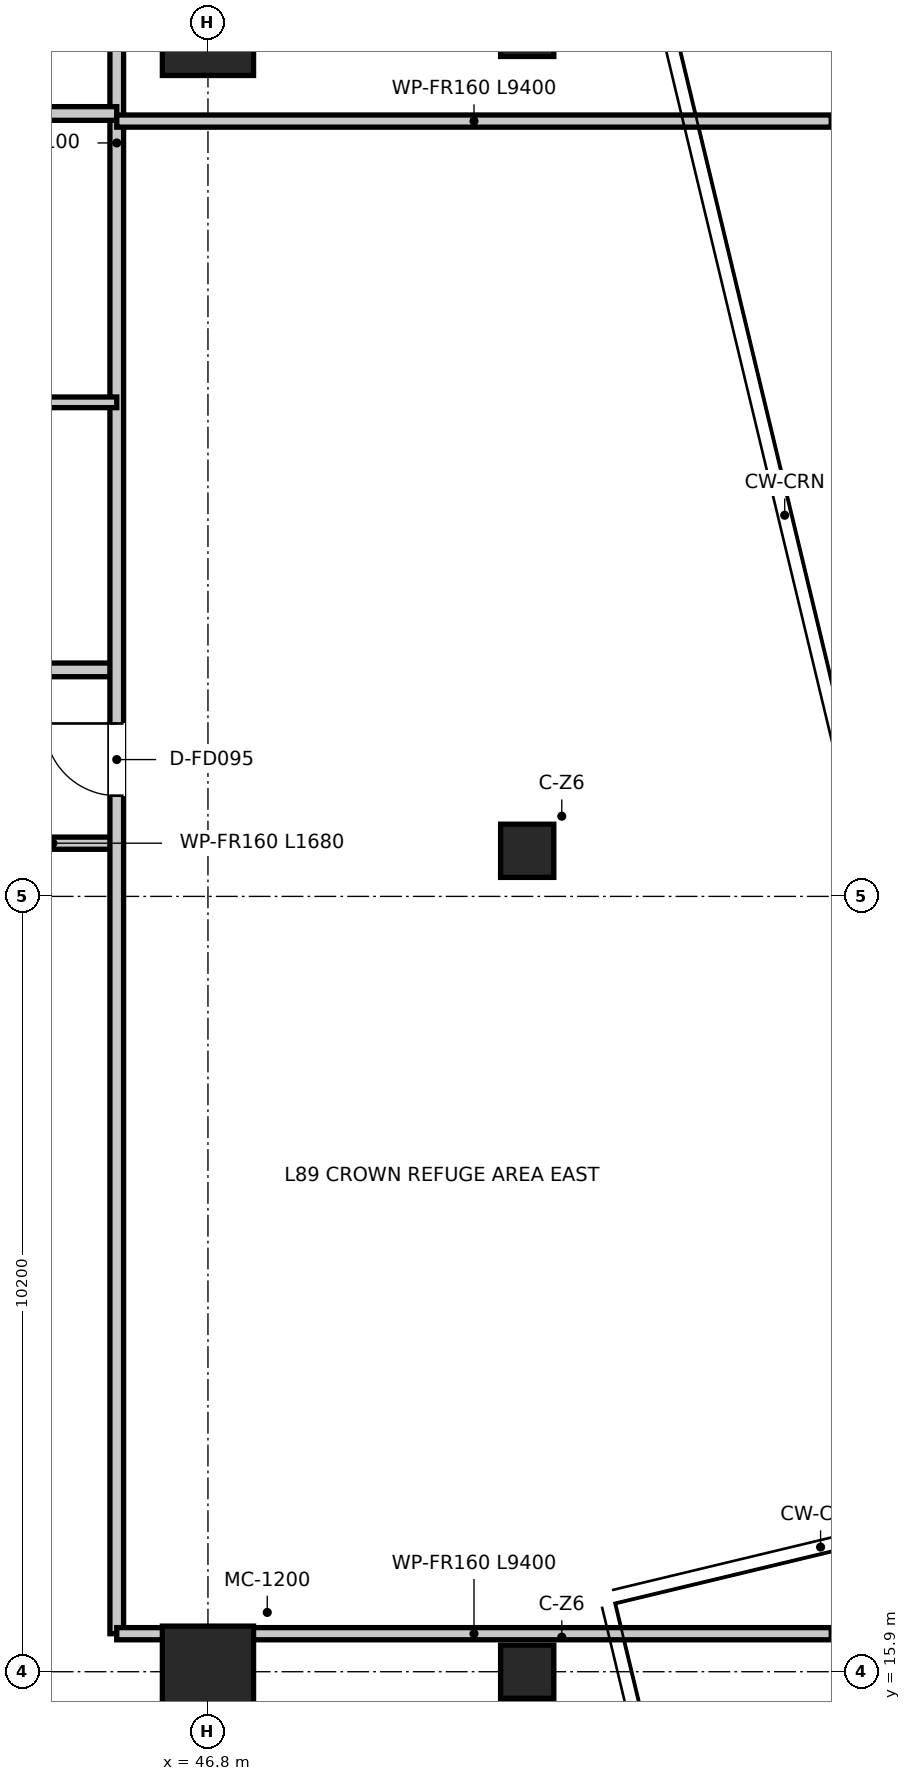
"""IFC4 building model, lengths in metres.
Left out: names, types, materials, properties, quantities, classifications, styles, units other than length and angle.
Written with IfcOpenShell. Run it as: python <this file> out.ifc"""

import sys

from ifc_helpers import new_model, si_unit, direction, frame, frame_2d, origin, origin_2d, place, context, subcontext, project, spatial, rectangle, extrude, source, transform, mapped, element, fill, save


model = new_model("IFC4")
c1 = context("Model", 3, precision=1e-05, world=origin(), true_north=direction((0.0, 1.0)))
c2 = subcontext(c1, "Body", "Model", "MODEL_VIEW")
j1 = project(units=[si_unit("LENGTHUNIT", "METRE"), si_unit("PLANEANGLEUNIT", "RADIAN")], contexts=[c1])
p1 = place(None, origin())
s1 = spatial("IfcSite", under=j1, at=p1, CompositionType="ELEMENT")
p2 = place(p1, origin())
s2 = spatial("IfcBuilding", under=s1, at=p2, CompositionType="ELEMENT")
p3 = place(p2, frame((0.0, 0.0, 363.25)))
s3 = spatial("IfcBuildingStorey", under=s2, at=p3, CompositionType="ELEMENT", Elevation=363.25)
m1 = source(origin(), c2, "Body", "SweptSolid", [
    extrude(rectangle(XDim=1.2, YDim=1.2, at=origin_2d()), origin(), (0.0, 0.0, 1.0), 3.8),
])
for number, where, z_axis, x_axis in (
    (1, (46.8, 15.9, 0.0), (0.0, 0.0, 1.0), (1.0, 0.0, 0.0)),
    (2, (46.8, 37.5, 0.0), (0.0, 0.0, 1.0), (1.0, 0.0, 0.0)),
):
    element("IfcColumn", number, at=place(p3, frame(where, z_axis=z_axis, x_axis=x_axis)), inside=s3, PredefinedType="USERDEFINED", context=c2, shape_type="MappedRepresentation", body=[
        mapped(m1, transform((0.0, 0.0, 0.0), x_axis=(1.0, 0.0, 0.0), y_axis=(0.0, 1.0, 0.0), z_axis=(0.0, 0.0, 1.0), scale=1.0)),
    ])
m2 = source(origin(), c2, "Body", "SweptSolid", [
    extrude(rectangle(XDim=0.7, YDim=0.7, at=origin_2d()), origin(), (0.0, 0.0, 1.0), 3.8),
])
for number, where, z_axis, x_axis in (
    (3, (51.0, 37.5, 0.0), (0.0, 0.0, 1.0), (1.0, 0.0, 0.0)),
    (4, (51.0, 26.7, 0.0), (0.0, 0.0, 1.0), (1.0, 0.0, 0.0)),
    (5, (51.0, 15.9, 0.0), (0.0, 0.0, 1.0), (1.0, 0.0, 0.0)),
):
    element("IfcColumn", number, at=place(p3, frame(where, z_axis=z_axis, x_axis=x_axis)), inside=s3, PredefinedType="COLUMN", context=c2, shape_type="MappedRepresentation", body=[
        mapped(m2, transform((0.0, 0.0, 0.0), x_axis=(1.0, 0.0, 0.0), y_axis=(0.0, 1.0, 0.0), z_axis=(0.0, 0.0, 1.0), scale=1.0)),
    ])
p4 = place(p3, frame((43.92, 26.8, 0.0), z_axis=(0.0, 0.0, 1.0), x_axis=(1.0, 0.0, 0.0)))
e6 = element("IfcWall", 6, at=p4, inside=s3, PredefinedType="PARTITIONING", context=c2, shape_type="SweptSolid", body=[
    extrude(rectangle(XDim=1.68, YDim=0.16, at=frame_2d((0.84, 0.0))), origin(), (0.0, 0.0, 1.0), 3.5),
])
p5 = place(p3, frame((37.08, 29.08, 0.0), z_axis=(0.0, 0.0, 1.0), x_axis=(1.0, 0.0, 0.0)))
e7 = element("IfcWall", 7, at=p5, inside=s3, PredefinedType="PARTITIONING", context=c2, shape_type="SweptSolid", body=[
    extrude(rectangle(XDim=8.52, YDim=0.18, at=frame_2d((4.26, 0.0))), origin(), (0.0, 0.0, 1.0), 2.8),
])
p6 = place(p5, frame((5.795, 0.0, 0.0)))
e8 = element("IfcOpeningElement", 8, at=p6, cuts=e7, PredefinedType="OPENING", context=c2, shape_type="SweptSolid", body=[
    extrude(rectangle(XDim=1.05, YDim=2.1, at=frame_2d((0.525, 1.05))), frame((0.0, 0.1, 0.0), z_axis=(0.0, -1.0, 0.0), x_axis=(1.0, 0.0, 0.0)), (0.0, 0.0, 1.0), 0.2),
])
p7 = place(p3, frame((45.6, 16.4, 0.0), z_axis=(0.0, 0.0, 1.0), x_axis=(0.0, 1.0, 0.0)))
e9 = element("IfcWall", 9, at=p7, inside=s3, PredefinedType="PARTITIONING", context=c2, shape_type="SweptSolid", body=[
    extrude(rectangle(XDim=27.1, YDim=0.18, at=frame_2d((13.55, 0.0))), origin(), (0.0, 0.0, 1.0), 2.8),
])
p8 = place(p7, frame((11.025, 0.0, 0.0)))
e10 = element("IfcOpeningElement", 10, at=p8, cuts=e9, PredefinedType="OPENING", context=c2, shape_type="SweptSolid", body=[
    extrude(rectangle(XDim=0.95, YDim=2.1, at=frame_2d((0.475, 1.05))), frame((0.0, 0.1, 0.0), z_axis=(0.0, -1.0, 0.0), x_axis=(1.0, 0.0, 0.0)), (0.0, 0.0, 1.0), 0.2),
])
p9 = place(p3, frame((26.4, 36.4, 0.0), z_axis=(0.0, 0.0, 1.0), x_axis=(1.0, 0.0, 0.0)))
e11 = element("IfcWall", 11, at=p9, inside=s3, PredefinedType="PARTITIONING", context=c2, shape_type="SweptSolid", body=[
    extrude(rectangle(XDim=19.2, YDim=0.18, at=frame_2d((9.6, 0.0))), origin(), (0.0, 0.0, 1.0), 2.8),
])
p10 = place(p9, frame((9.075, 0.0, 0.0)))
e12 = element("IfcOpeningElement", 12, at=p10, cuts=e11, PredefinedType="OPENING", context=c2, shape_type="SweptSolid", body=[
    extrude(rectangle(XDim=1.05, YDim=2.1, at=frame_2d((0.525, 1.05))), frame((0.0, 0.1, 0.0), z_axis=(0.0, -1.0, 0.0), x_axis=(1.0, 0.0, 0.0)), (0.0, 0.0, 1.0), 0.2),
])
p11 = place(p3, frame((37.08, 32.6, 0.0), z_axis=(0.0, 0.0, 1.0), x_axis=(1.0, 0.0, 0.0)))
e13 = element("IfcWall", 13, at=p11, inside=s3, PredefinedType="PARTITIONING", context=c2, shape_type="SweptSolid", body=[
    extrude(rectangle(XDim=8.52, YDim=0.14, at=frame_2d((4.26, 0.0))), origin(), (0.0, 0.0, 1.0), 2.8),
])
p12 = place(p11, frame((5.845, 0.0, 0.0)))
e14 = element("IfcOpeningElement", 14, at=p12, cuts=e13, PredefinedType="OPENING", context=c2, shape_type="SweptSolid", body=[
    extrude(rectangle(XDim=0.95, YDim=2.1, at=frame_2d((0.475, 1.05))), frame((0.0, 0.08, 0.0), z_axis=(0.0, -1.0, 0.0), x_axis=(1.0, 0.0, 0.0)), (0.0, 0.0, 1.0), 0.16),
])
for number, where, z_axis, x_axis in (
    (15, (45.6, 16.4, 0.0), (0.0, 0.0, 1.0), (1.0, 0.0, 0.0)),
    (16, (45.6, 36.3, 0.0), (0.0, 0.0, 1.0), (1.0, 0.0, 0.0)),
):
    element("IfcWall", number, at=place(p3, frame(where, z_axis=z_axis, x_axis=x_axis)), inside=s3, PredefinedType="PARTITIONING", context=c2, shape_type="SweptSolid", body=[
        extrude(rectangle(XDim=9.4, YDim=0.16, at=frame_2d((4.7, 0.0))), origin(), (0.0, 0.0, 1.0), 2.8),
    ])
p13 = place(p8, origin())
e17 = element("IfcDoor", 17, at=p13, inside=s3, OperationType="SINGLE_SWING_RIGHT", PredefinedType="DOOR", context=c2, shape_type="SweptSolid", body=[
    extrude(rectangle(XDim=0.95, YDim=2.1, at=frame_2d((0.475, 1.05))), frame((0.0, 0.025, 0.0), z_axis=(0.0, -1.0, 0.0), x_axis=(1.0, 0.0, 0.0)), (0.0, 0.0, 1.0), 0.05),
])
fill(e10, e17)
save(model, sys.argv[1])
